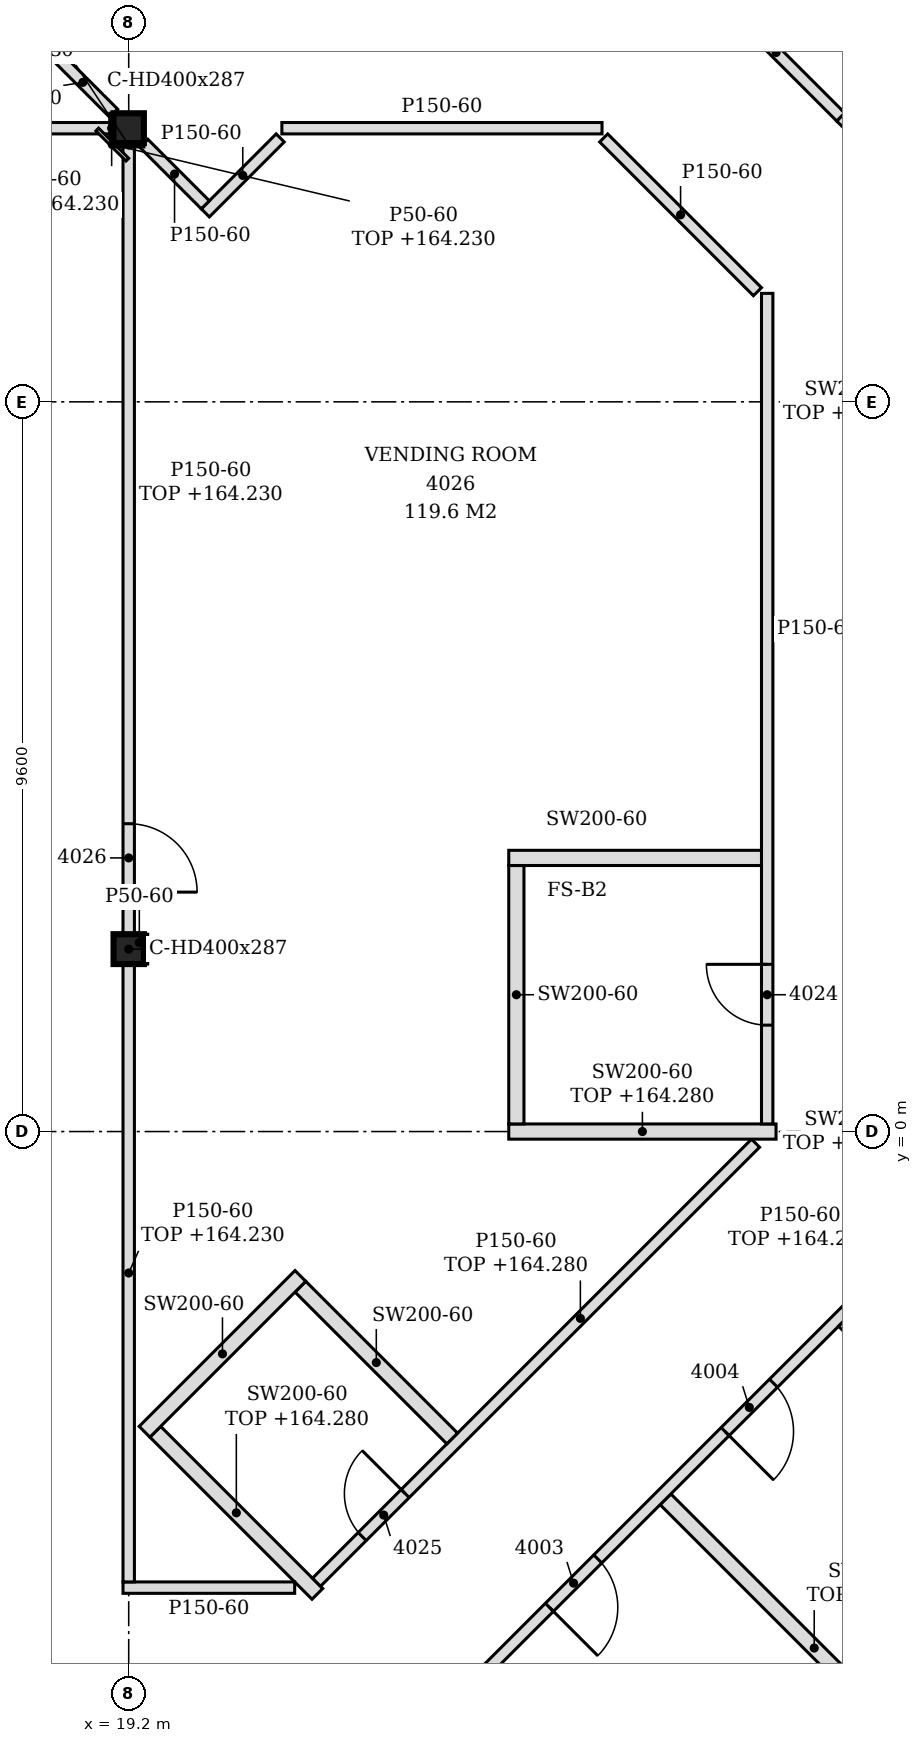
"""IFC4 building model, lengths in metres.
Left out: names, types, materials, properties, quantities, classifications, styles, units other than length and angle.
Written with IfcOpenShell. Run it as: python <this file> out.ifc"""

import sys

from ifc_helpers import new_model, si_unit, direction, frame, frame_2d, origin, origin_2d, place, context, subcontext, project, spatial, polyline, rectangle, i_section, outline, extrude, element, fill, save


model = new_model("IFC4")
c1 = context("Model", 3, precision=1e-05, world=origin(), true_north=direction((0.0, 1.0)))
c2 = subcontext(c1, "Body", "Model", "MODEL_VIEW")
j1 = project(units=[si_unit("LENGTHUNIT", "METRE"), si_unit("PLANEANGLEUNIT", "RADIAN")], contexts=[c1])
p1 = place(None, origin())
s1 = spatial("IfcSite", under=j1, at=p1, CompositionType="ELEMENT")
p2 = place(p1, origin())
s2 = spatial("IfcBuilding", under=s1, at=p2, CompositionType="ELEMENT")
p3 = place(p2, frame((0.0, 0.0, 161.4)))
s3 = spatial("IfcBuildingStorey", under=s2, at=p3, CompositionType="ELEMENT", Elevation=161.4)
for number, where, z_axis, x_axis in (
    (1, (19.2, 2.4, -0.15), (0.0, 0.0, 1.0), (1.0, 0.0, 0.0)),
    (2, (19.2, 13.2, -0.15), (0.0, 0.0, 1.0), (1.0, 0.0, 0.0)),
):
    element("IfcColumn", number, at=place(p3, frame(where, z_axis=z_axis, x_axis=x_axis)), inside=s3, PredefinedType="COLUMN", context=c2, shape_type="SweptSolid", body=[
        extrude(i_section(OverallWidth=0.399, OverallDepth=0.393, WebThickness=0.023, FlangeThickness=0.037, FilletRadius=0.015, at=origin_2d()), origin(), (0.0, 0.0, 1.0), 3.6),
    ])
p4 = place(p3, frame((30.176, -8.752, 0.0), z_axis=(0.0, 0.0, 1.0), x_axis=(-0.707084725798, 0.707128835887, 0.0)))
e3 = element("IfcWall", 3, at=p4, inside=s3, PredefinedType="PARTITIONING", context=c2, shape_type="SweptSolid", body=[
    extrude(rectangle(XDim=5.535, YDim=0.2, at=frame_2d((2.768, 0.0))), origin(), (0.0, 0.0, 1.0), 2.88),
])
p5 = place(p3, frame((22.722, -8.272, 0.0), z_axis=(0.0, 0.0, 1.0), x_axis=(0.707106781187, 0.707106781187, 0.0)))
e4 = element("IfcWall", 4, at=p5, inside=s3, PredefinedType="PARTITIONING", context=c2, shape_type="SweptSolid", body=[
    extrude(rectangle(XDim=10.399, YDim=0.15, at=frame_2d((5.199, 0.0))), origin(), (0.0, 0.0, 1.0), 2.88),
])
p6 = place(p5, frame((2.846, 0.0, 0.0)))
e5 = element("IfcOpeningElement", 5, at=p6, cuts=e4, PredefinedType="OPENING", context=c2, shape_type="SweptSolid", body=[
    extrude(rectangle(XDim=0.9, YDim=2.1, at=frame_2d((0.45, 1.05))), frame((0.0, 0.085, 0.0), z_axis=(0.0, -1.0, 0.0), x_axis=(1.0, 0.0, 0.0)), (0.0, 0.0, 1.0), 0.17),
])
p7 = place(p5, frame((6.116, 0.0, 0.0)))
e6 = element("IfcOpeningElement", 6, at=p7, cuts=e4, PredefinedType="OPENING", context=c2, shape_type="SweptSolid", body=[
    extrude(rectangle(XDim=0.9, YDim=2.1, at=frame_2d((0.45, 1.05))), frame((0.0, 0.085, 0.0), z_axis=(0.0, -1.0, 0.0), x_axis=(1.0, 0.0, 0.0)), (0.0, 0.0, 1.0), 0.17),
])
p8 = place(p3, frame((33.155, -7.107, 0.0), z_axis=(0.0, 0.0, 1.0), x_axis=(-0.70708794033, 0.707125621541, 0.0)))
e7 = element("IfcWall", 7, at=p8, inside=s3, PredefinedType="PARTITIONING", context=c2, shape_type="SweptSolid", body=[
    extrude(rectangle(XDim=6.479, YDim=0.1, at=frame_2d((3.24, 0.0))), origin(), (0.0, 0.0, 1.0), 2.88),
])
p9 = place(p8, frame((2.637, 0.0, 0.0)))
e8 = element("IfcOpeningElement", 8, at=p9, cuts=e7, PredefinedType="OPENING", context=c2, shape_type="SweptSolid", body=[
    extrude(rectangle(XDim=0.9, YDim=2.1, at=frame_2d((0.45, 1.05))), frame((0.0, 0.06, 0.0), z_axis=(0.0, -1.0, 0.0), x_axis=(1.0, 0.0, 0.0)), (0.0, 0.0, 1.0), 0.12),
])
p10 = place(p3, frame((21.682, -6.082, 0.0), z_axis=(0.0, 0.0, 1.0), x_axis=(-0.707106781187, 0.707106781187, 0.0)))
e9 = element("IfcWall", 9, at=p10, inside=s3, PredefinedType="PARTITIONING", context=c2, shape_type="SweptSolid", body=[
    extrude(rectangle(XDim=3.016, YDim=0.2, at=frame_2d((1.508, 0.0))), origin(), (0.0, 0.0, 1.0), 2.88),
])
p11 = place(p3, frame((19.125, -6.0, 0.0), z_axis=(0.0, 0.0, 1.0), x_axis=(1.0, 0.0, 0.0)))
e10 = element("IfcWall", 10, at=p11, inside=s3, PredefinedType="PARTITIONING", context=c2, shape_type="SweptSolid", body=[
    extrude(outline(polyline([(0.0, 0.0), (2.259, 0.0), (2.259, 3.45), (0.225, 3.45), (0.223, 2.83), (0.0, 2.83), (0.0, 0.0)])), frame((0.0, 0.075, 0.0), z_axis=(0.0, -1.0, 0.0), x_axis=(1.0, 0.0, 0.0)), (0.0, 0.0, 1.0), 0.15),
])
p12 = place(p3, frame((19.2, -5.925, 0.0), z_axis=(0.0, 0.0, 1.0), x_axis=(0.0, 1.0, 0.0)))
e11 = element("IfcWall", 11, at=p12, inside=s3, PredefinedType="PARTITIONING", context=c2, shape_type="SweptSolid", body=[
    extrude(rectangle(XDim=8.129, YDim=0.15, at=frame_2d((4.064, 0.0))), origin(), (0.0, 0.0, 1.0), 2.83),
])
p13 = place(p3, frame((21.671, -5.929, 0.0), z_axis=(0.0, 0.0, 1.0), x_axis=(0.707121724429, 0.707091837628, 0.0)))
e12 = element("IfcWall", 12, at=p13, inside=s3, PredefinedType="PARTITIONING", context=c2, shape_type="SweptSolid", body=[
    extrude(rectangle(XDim=8.169, YDim=0.15, at=frame_2d((4.084, 0.0))), origin(), (0.0, 0.0, 1.0), 2.88),
])
p14 = place(p13, frame((0.85, 0.0, 0.0)))
e13 = element("IfcOpeningElement", 13, at=p14, cuts=e12, PredefinedType="OPENING", context=c2, shape_type="SweptSolid", body=[
    extrude(rectangle(XDim=0.8, YDim=2.1, at=frame_2d((0.4, 1.05))), frame((0.0, 0.085, 0.0), z_axis=(0.0, -1.0, 0.0), x_axis=(1.0, 0.0, 0.0)), (0.0, 0.0, 1.0), 0.17),
])
p15 = place(p3, frame((23.456, -4.038, 0.0), z_axis=(0.0, 0.0, 1.0), x_axis=(-0.707106781187, 0.707106781187, 0.0)))
e14 = element("IfcWall", 14, at=p15, inside=s3, PredefinedType="PARTITIONING", context=c2, shape_type="SweptSolid", body=[
    extrude(rectangle(XDim=2.825, YDim=0.2, at=frame_2d((1.412, 0.0))), origin(), (0.0, 0.0, 1.0), 3.45),
])
p16 = place(p3, frame((19.408, -3.95, 0.0), z_axis=(0.0, 0.0, 1.0), x_axis=(0.70714887714, 0.707064682727, 0.0)))
e15 = element("IfcWall", 15, at=p16, inside=s3, PredefinedType="PARTITIONING", context=c2, shape_type="SweptSolid", body=[
    extrude(rectangle(XDim=2.9, YDim=0.2, at=frame_2d((1.45, 0.0))), origin(), (0.0, 0.0, 1.0), 3.45),
])
p17 = place(p3, frame((24.2, 0.0, 0.0), z_axis=(0.0, 0.0, 1.0), x_axis=(1.0, 0.0, 0.0)))
e16 = element("IfcWall", 16, at=p17, inside=s3, PredefinedType="PARTITIONING", context=c2, shape_type="SweptSolid", body=[
    extrude(rectangle(XDim=3.516, YDim=0.2, at=frame_2d((1.758, 0.0))), origin(), (0.0, 0.0, 1.0), 2.88),
])
p18 = place(p3, frame((24.3, 0.1, 0.0), z_axis=(0.0, 0.0, 1.0), x_axis=(0.0, 1.0, 0.0)))
e17 = element("IfcWall", 17, at=p18, inside=s3, PredefinedType="PARTITIONING", context=c2, shape_type="SweptSolid", body=[
    extrude(outline(polyline([(0.0, 0.0), (3.4, 0.0), (3.4, 3.45), (0.005, 3.45), (0.003, 2.88), (0.0, 2.88), (0.0, 0.0)])), frame((0.0, 0.1, 0.0), z_axis=(0.0, -1.0, 0.0), x_axis=(1.0, 0.0, 0.0)), (0.0, 0.0, 1.0), 0.2),
])
p19 = place(p3, frame((27.6, 0.1, 0.0), z_axis=(0.0, 0.0, 1.0), x_axis=(0.0, 1.0, 0.0)))
e18 = element("IfcWall", 18, at=p19, inside=s3, PredefinedType="PARTITIONING", context=c2, shape_type="SweptSolid", body=[
    extrude(outline(polyline([(0.0, 0.0), (10.927, 0.0), (10.927, 3.45), (9.605, 3.45), (9.603, 2.88), (9.395, 2.88), (9.393, 3.45), (4.805, 3.45), (4.803, 2.88), (4.595, 2.88), (4.593, 3.45), (0.005, 3.45), (0.003, 2.88), (0.0, 2.88), (0.0, 0.0)])), frame((0.0, 0.075, 0.0), z_axis=(0.0, -1.0, 0.0), x_axis=(1.0, 0.0, 0.0)), (0.0, 0.0, 1.0), 0.15),
])
p20 = place(p19, frame((1.3, 0.0, 0.0)))
e19 = element("IfcOpeningElement", 19, at=p20, cuts=e18, PredefinedType="OPENING", context=c2, shape_type="SweptSolid", body=[
    extrude(rectangle(XDim=0.8, YDim=2.1, at=frame_2d((0.4, 1.05))), frame((0.0, 0.085, 0.0), z_axis=(0.0, -1.0, 0.0), x_axis=(1.0, 0.0, 0.0)), (0.0, 0.0, 1.0), 0.17),
])
p21 = place(p3, frame((19.2, 2.596, 0.0), z_axis=(0.0, 0.0, 1.0), x_axis=(0.0, 1.0, 0.0)))
e20 = element("IfcWall", 20, at=p21, inside=s3, PredefinedType="PARTITIONING", context=c2, shape_type="SweptSolid", body=[
    extrude(rectangle(XDim=10.407, YDim=0.15, at=frame_2d((5.204, 0.0))), origin(), (0.0, 0.0, 1.0), 2.83),
])
p22 = place(p21, frame((0.553, 0.0, 0.0)))
e21 = element("IfcOpeningElement", 21, at=p22, cuts=e20, PredefinedType="OPENING", context=c2, shape_type="SweptSolid", body=[
    extrude(rectangle(XDim=0.9, YDim=2.1, at=frame_2d((0.45, 1.05))), frame((0.0, 0.085, 0.0), z_axis=(0.0, -1.0, 0.0), x_axis=(1.0, 0.0, 0.0)), (0.0, 0.0, 1.0), 0.17),
])
p23 = place(p3, frame((24.2, 3.6, 0.0), z_axis=(0.0, 0.0, 1.0), x_axis=(1.0, 0.0, 0.0)))
e22 = element("IfcWall", 22, at=p23, inside=s3, PredefinedType="PARTITIONING", context=c2, shape_type="SweptSolid", body=[
    extrude(rectangle(XDim=3.325, YDim=0.2, at=frame_2d((1.663, 0.0))), origin(), (0.0, 0.0, 1.0), 3.45),
])
p24 = place(p3, frame((27.472, 11.049, 0.0), z_axis=(0.0, 0.0, 1.0), x_axis=(-0.707106781187, 0.707106781187, 0.0)))
e23 = element("IfcWall", 23, at=p24, inside=s3, PredefinedType="PARTITIONING", context=c2, shape_type="SweptSolid", body=[
    extrude(rectangle(XDim=2.861, YDim=0.15, at=frame_2d((1.43, 0.0))), origin(), (0.0, 0.0, 1.0), 3.45),
])
p25 = place(p3, frame((29.872, 12.043, 0.0), z_axis=(0.0, 0.0, 1.0), x_axis=(-0.707172918471, 0.707040637716, 0.0)))
e24 = element("IfcWall", 24, at=p25, inside=s3, PredefinedType="PARTITIONING", context=c2, shape_type="SweptSolid", body=[
    extrude(rectangle(XDim=1.846, YDim=0.15, at=frame_2d((0.923, 0.0))), origin(), (0.0, 0.0, 1.0), 3.45),
])
p26 = place(p3, frame((20.208, 12.086, 0.0), z_axis=(0.0, 0.0, 1.0), x_axis=(0.706756381459, 0.707457007363, 0.0)))
e25 = element("IfcWall", 25, at=p26, inside=s3, PredefinedType="PARTITIONING", context=c2, shape_type="SweptSolid", body=[
    extrude(rectangle(XDim=1.394, YDim=0.15, at=frame_2d((0.697, 0.0))), origin(), (0.0, 0.0, 1.0), 3.45),
])
p27 = place(p3, frame((20.208, 12.192, 0.0), z_axis=(0.0, 0.0, 1.0), x_axis=(-0.70721334539, 0.707000200921, 0.0)))
e26 = element("IfcWall", 26, at=p27, inside=s3, PredefinedType="PARTITIONING", context=c2, shape_type="SweptSolid", body=[
    extrude(rectangle(XDim=1.146, YDim=0.15, at=frame_2d((0.573, 0.0))), origin(), (0.0, 0.0, 1.0), 3.45),
])
p28 = place(p3, frame((7.399, 13.2, 0.0), z_axis=(0.0, 0.0, 1.0), x_axis=(1.0, 0.0, 0.0)))
e27 = element("IfcWall", 27, at=p28, inside=s3, PredefinedType="PARTITIONING", context=c2, shape_type="SweptSolid", body=[
    extrude(rectangle(XDim=11.601, YDim=0.15, at=frame_2d((5.801, 0.0))), origin(), (0.0, 0.0, 1.0), 2.83),
])
p29 = place(p28, frame((2.95, 0.0, 0.0)))
e28 = element("IfcOpeningElement", 28, at=p29, cuts=e27, PredefinedType="OPENING", context=c2, shape_type="SweptSolid", body=[
    extrude(rectangle(XDim=0.9, YDim=2.1, at=frame_2d((0.45, 1.05))), frame((0.0, 0.085, 0.0), z_axis=(0.0, -1.0, 0.0), x_axis=(1.0, 0.0, 0.0)), (0.0, 0.0, 1.0), 0.17),
])
p30 = place(p3, frame((21.215, 13.2, 0.0), z_axis=(0.0, 0.0, 1.0), x_axis=(1.0, 0.0, 0.0)))
e29 = element("IfcWall", 29, at=p30, inside=s3, PredefinedType="PARTITIONING", context=c2, shape_type="SweptSolid", body=[
    extrude(rectangle(XDim=4.212, YDim=0.15, at=frame_2d((2.106, 0.0))), origin(), (0.0, 0.0, 1.0), 3.45),
])
p31 = place(p3, frame((28.567, 13.348, 0.0), z_axis=(0.0, 0.0, 1.0), x_axis=(-0.707310148094, 0.706903355773, 0.0)))
e30 = element("IfcWall", 30, at=p31, inside=s3, PredefinedType="PARTITIONING", context=c2, shape_type="SweptSolid", body=[
    extrude(rectangle(XDim=2.401, YDim=0.15, at=frame_2d((1.2, 0.0))), origin(), (0.0, 0.0, 1.0), 2.88),
])
p32 = place(p3, frame((19.002, 13.398, 0.0), z_axis=(0.0, 0.0, 1.0), x_axis=(-0.707000200921, 0.70721334539, 0.0)))
e31 = element("IfcWall", 31, at=p32, inside=s3, PredefinedType="PARTITIONING", context=c2, shape_type="SweptSolid", body=[
    extrude(rectangle(XDim=1.146, YDim=0.15, at=frame_2d((0.573, 0.0))), origin(), (0.0, 0.0, 1.0), 3.45),
])
p33 = place(p3, frame((28.62, 13.401, 0.0), z_axis=(0.0, 0.0, 1.0), x_axis=(0.707055379538, 0.707158179099, 0.0)))
e32 = element("IfcWall", 32, at=p33, inside=s3, PredefinedType="PARTITIONING", context=c2, shape_type="SweptSolid", body=[
    extrude(rectangle(XDim=2.375, YDim=0.1, at=frame_2d((1.188, 0.0))), origin(), (0.0, 0.0, 1.0), 2.88),
])
p34 = place(p3, frame((18.086, 14.208, 0.0), z_axis=(0.0, 0.0, 1.0), x_axis=(0.70739723372, 0.706816209298, 0.0)))
e33 = element("IfcWall", 33, at=p34, inside=s3, PredefinedType="PARTITIONING", context=c2, shape_type="SweptSolid", body=[
    extrude(rectangle(XDim=1.681, YDim=0.15, at=frame_2d((0.84, 0.0))), origin(), (0.0, 0.0, 1.0), 2.73),
])
p35 = place(p3, frame((19.425, 2.204, 0.0), z_axis=(0.0, 0.0, 1.0), x_axis=(0.0, 1.0, 0.0)))
e34 = element("IfcWall", 34, at=p35, inside=s3, PredefinedType="PARTITIONING", context=c2, shape_type="SweptSolid", body=[
    extrude(rectangle(XDim=0.393, YDim=0.05, at=frame_2d((0.196, 0.0))), origin(), (0.0, 0.0, 1.0), 3.45),
])
p36 = place(p3, frame((18.976, 13.003, 0.0), z_axis=(0.0, 0.0, 1.0), x_axis=(0.0, 1.0, 0.0)))
e35 = element("IfcWall", 35, at=p36, inside=s3, PredefinedType="PARTITIONING", context=c2, shape_type="SweptSolid", body=[
    extrude(rectangle(XDim=0.393, YDim=0.05, at=frame_2d((0.197, 0.0))), origin(), (0.0, 0.0, 1.0), 2.83),
])
p37 = place(p3, frame((19.182, 12.786, 0.0), z_axis=(0.0, 0.0, 1.0), x_axis=(-0.707106781187, 0.707106781187, 0.0)))
e36 = element("IfcWall", 36, at=p37, inside=s3, PredefinedType="PARTITIONING", context=c2, shape_type="SweptSolid", body=[
    extrude(rectangle(XDim=0.56, YDim=0.05, at=frame_2d((0.28, 0.0))), origin(), (0.0, 0.0, 1.0), 2.83),
])
p38 = place(p3, frame((19.0, 12.979, 0.0), z_axis=(0.0, 0.0, 1.0), x_axis=(1.0, 0.0, 0.0)))
e37 = element("IfcWall", 37, at=p38, inside=s3, PredefinedType="PARTITIONING", context=c2, shape_type="SweptSolid", body=[
    extrude(rectangle(XDim=0.399, YDim=0.05, at=frame_2d((0.199, 0.0))), origin(), (0.0, 0.0, 1.0), 2.83),
])
p39 = place(p6, frame((0.9, 0.0, 0.0), z_axis=(0.0, 0.0, 1.0), x_axis=(-1.0, 0.0, 0.0)))
e38 = element("IfcDoor", 38, at=p39, inside=s3, OperationType="SINGLE_SWING_RIGHT", PredefinedType="DOOR", context=c2, shape_type="SweptSolid", body=[
    extrude(rectangle(XDim=0.9, YDim=2.1, at=frame_2d((0.45, 1.05))), frame((0.0, 0.025, 0.0), z_axis=(0.0, -1.0, 0.0), x_axis=(1.0, 0.0, 0.0)), (0.0, 0.0, 1.0), 0.05),
])
fill(e5, e38)
p40 = place(p7, frame((0.9, 0.0, 0.0), z_axis=(0.0, 0.0, 1.0), x_axis=(-1.0, 0.0, 0.0)))
e39 = element("IfcDoor", 39, at=p40, inside=s3, OperationType="SINGLE_SWING_RIGHT", PredefinedType="DOOR", context=c2, shape_type="SweptSolid", body=[
    extrude(rectangle(XDim=0.9, YDim=2.1, at=frame_2d((0.45, 1.05))), frame((0.0, 0.025, 0.0), z_axis=(0.0, -1.0, 0.0), x_axis=(1.0, 0.0, 0.0)), (0.0, 0.0, 1.0), 0.05),
])
fill(e6, e39)
p41 = place(p20, origin())
e40 = element("IfcDoor", 40, at=p41, inside=s3, OperationType="SINGLE_SWING_RIGHT", PredefinedType="DOOR", context=c2, shape_type="SweptSolid", body=[
    extrude(rectangle(XDim=0.8, YDim=2.1, at=frame_2d((0.4, 1.05))), frame((0.0, 0.025, 0.0), z_axis=(0.0, -1.0, 0.0), x_axis=(1.0, 0.0, 0.0)), (0.0, 0.0, 1.0), 0.05),
])
fill(e19, e40)
p42 = place(p14, origin())
e41 = element("IfcDoor", 41, at=p42, inside=s3, OperationType="SINGLE_SWING_RIGHT", PredefinedType="DOOR", context=c2, shape_type="SweptSolid", body=[
    extrude(rectangle(XDim=0.8, YDim=2.1, at=frame_2d((0.4, 1.05))), frame((0.0, 0.025, 0.0), z_axis=(0.0, -1.0, 0.0), x_axis=(1.0, 0.0, 0.0)), (0.0, 0.0, 1.0), 0.05),
])
fill(e13, e41)
p43 = place(p22, frame((0.9, 0.0, 0.0), z_axis=(0.0, 0.0, 1.0), x_axis=(-1.0, 0.0, 0.0)))
e42 = element("IfcDoor", 42, at=p43, inside=s3, OperationType="SINGLE_SWING_RIGHT", PredefinedType="DOOR", context=c2, shape_type="SweptSolid", body=[
    extrude(rectangle(XDim=0.9, YDim=2.1, at=frame_2d((0.45, 1.05))), frame((0.0, 0.025, 0.0), z_axis=(0.0, -1.0, 0.0), x_axis=(1.0, 0.0, 0.0)), (0.0, 0.0, 1.0), 0.05),
])
fill(e21, e42)
save(model, sys.argv[1])
